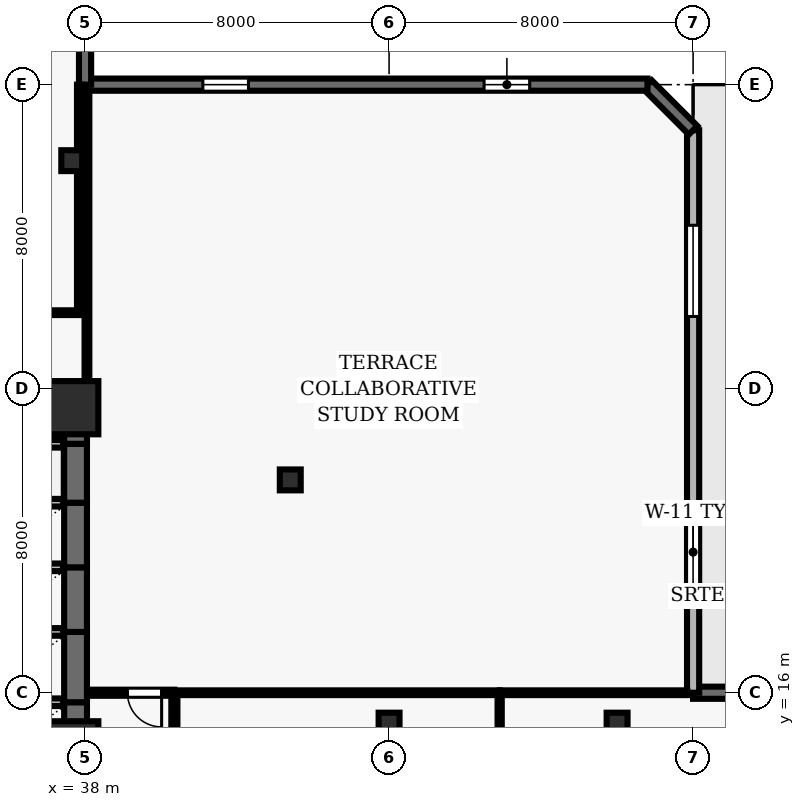
"""IFC4 building model, lengths in metres.
Left out: names, types, materials, properties, quantities, classifications, styles, units other than length and angle.
Written with IfcOpenShell. Run it as: python <this file> out.ifc"""

import sys

from ifc_helpers import new_model, si_unit, direction, frame, frame_2d, origin, origin_2d, place, context, subcontext, project, spatial, rectangle, hollow_rectangle, extrude, element, fill, save


model = new_model("IFC4")
c1 = context("Model", 3, precision=1e-05, world=origin(), true_north=direction((0.0, 1.0)))
c2 = subcontext(c1, "Body", "Model", "MODEL_VIEW")
j1 = project(units=[si_unit("LENGTHUNIT", "METRE"), si_unit("PLANEANGLEUNIT", "RADIAN")], contexts=[c1])
p1 = place(None, origin())
s1 = spatial("IfcSite", under=j1, at=p1, CompositionType="ELEMENT")
p2 = place(p1, origin())
s2 = spatial("IfcBuilding", under=s1, at=p2, CompositionType="ELEMENT")
p3 = place(p2, frame((0.0, 0.0, 26.0)))
s3 = spatial("IfcBuildingStorey", under=s2, at=p3, CompositionType="ELEMENT", Elevation=26.0)
for number, where, z_axis, x_axis in (
    (1, (37.65, 14.55, 0.0), (0.0, 0.0, 1.0), (1.0, 0.0, 0.0)),
    (2, (37.65, 23.5, 0.0), (0.0, 0.0, 1.0), (1.0, 0.0, 0.0)),
):
    element("IfcColumn", number, at=place(p3, frame(where, z_axis=z_axis, x_axis=x_axis)), inside=s3, PredefinedType="COLUMN", context=c2, shape_type="SweptSolid", body=[
        extrude(rectangle(XDim=1.4, YDim=1.4, at=origin_2d()), origin(), (0.0, 0.0, 1.0), 5.0),
    ])
for number, where, z_axis, x_axis in (
    (3, (46.0, 15.2, 0.0), (0.0, 0.0, 1.0), (1.0, 0.0, 0.0)),
    (4, (52.0, 15.2, 0.0), (0.0, 0.0, 1.0), (1.0, 0.0, 0.0)),
    (5, (37.65, 30.0, 0.0), (0.0, 0.0, 1.0), (1.0, 0.0, 0.0)),
    (6, (43.4, 21.6, 0.0), (0.0, 0.0, 1.0), (1.0, 0.0, 0.0)),
):
    element("IfcColumn", number, at=place(p3, frame(where, z_axis=z_axis, x_axis=x_axis)), inside=s3, PredefinedType="COLUMN", context=c2, shape_type="SweptSolid", body=[
        extrude(hollow_rectangle(XDim=0.55, YDim=0.55, WallThickness=0.025, at=origin_2d()), origin(), (0.0, 0.0, 1.0), 5.0),
    ])
p4 = place(p3, frame((73.5, 16.0, 0.0), z_axis=(0.0, 0.0, 1.0), x_axis=(-1.0, 0.0, 0.0)))
e7 = element("IfcWall", 7, at=p4, inside=s3, PredefinedType="SOLIDWALL", context=c2, shape_type="SweptSolid", body=[
    extrude(rectangle(XDim=19.5, YDim=0.32, at=frame_2d((9.75, 0.0))), origin(), (0.0, 0.0, 1.0), 4.79),
])
p5 = place(p4, frame((7.275, 0.0, 0.0)))
e8 = element("IfcOpeningElement", 8, at=p5, cuts=e7, PredefinedType="OPENING", context=c2, shape_type="SweptSolid", body=[
    extrude(rectangle(XDim=1.35, YDim=2.2, at=frame_2d((0.675, 1.1))), frame((0.0, 0.17, 0.0), z_axis=(0.0, -1.0, 0.0), x_axis=(1.0, 0.0, 0.0)), (0.0, 0.0, 1.0), 0.34),
])
p6 = place(p4, frame((2.35, 0.0, 0.9)))
e9 = element("IfcOpeningElement", 9, at=p6, cuts=e7, PredefinedType="OPENING", context=c2, shape_type="SweptSolid", body=[
    extrude(rectangle(XDim=1.8, YDim=2.2, at=frame_2d((0.9, 1.1))), frame((0.0, 0.17, 0.0), z_axis=(0.0, -1.0, 0.0), x_axis=(1.0, 0.0, 0.0)), (0.0, 0.0, 1.0), 0.34),
])
p7 = place(p3, frame((54.0, 16.0, 0.0), z_axis=(0.0, 0.0, 1.0), x_axis=(0.0, 1.0, 0.0)))
e10 = element("IfcWall", 10, at=p7, inside=s3, PredefinedType="SOLIDWALL", context=c2, shape_type="SweptSolid", body=[
    extrude(rectangle(XDim=14.8, YDim=0.32, at=frame_2d((7.4, 0.0))), origin(), (0.0, 0.0, 1.0), 4.79),
])
p8 = place(p7, frame((2.5, 0.0, 0.9)))
e11 = element("IfcOpeningElement", 11, at=p8, cuts=e10, PredefinedType="OPENING", context=c2, shape_type="SweptSolid", body=[
    extrude(rectangle(XDim=2.4, YDim=2.2, at=frame_2d((1.2, 1.1))), frame((0.0, 0.17, 0.0), z_axis=(0.0, -1.0, 0.0), x_axis=(1.0, 0.0, 0.0)), (0.0, 0.0, 1.0), 0.34),
])
p9 = place(p7, frame((9.9, 0.0, 0.9)))
e12 = element("IfcOpeningElement", 12, at=p9, cuts=e10, PredefinedType="OPENING", context=c2, shape_type="SweptSolid", body=[
    extrude(rectangle(XDim=2.4, YDim=2.2, at=frame_2d((1.2, 1.1))), frame((0.0, 0.17, 0.0), z_axis=(0.0, -1.0, 0.0), x_axis=(1.0, 0.0, 0.0)), (0.0, 0.0, 1.0), 0.34),
])
p10 = place(p3, frame((54.0, 30.8, 0.0), z_axis=(0.0, 0.0, 1.0), x_axis=(-0.707106781187, 0.707106781187, 0.0)))
e13 = element("IfcWall", 13, at=p10, inside=s3, PredefinedType="SOLIDWALL", context=c2, shape_type="SweptSolid", body=[
    extrude(rectangle(XDim=1.697, YDim=0.32, at=frame_2d((0.849, 0.0))), origin(), (0.0, 0.0, 1.0), 4.79),
])
p11 = place(p3, frame((52.8, 32.0, 0.0), z_axis=(0.0, 0.0, 1.0), x_axis=(-1.0, 0.0, 0.0)))
e14 = element("IfcWall", 14, at=p11, inside=s3, PredefinedType="SOLIDWALL", context=c2, shape_type="SweptSolid", body=[
    extrude(rectangle(XDim=14.8, YDim=0.32, at=frame_2d((7.4, 0.0))), origin(), (0.0, 0.0, 1.0), 4.79),
])
p12 = place(p11, frame((3.1, 0.0, 0.9)))
e15 = element("IfcOpeningElement", 15, at=p12, cuts=e14, PredefinedType="OPENING", context=c2, shape_type="SweptSolid", body=[
    extrude(rectangle(XDim=1.2, YDim=1.6, at=frame_2d((0.6, 0.8))), frame((0.0, 0.17, 0.0), z_axis=(0.0, -1.0, 0.0), x_axis=(1.0, 0.0, 0.0)), (0.0, 0.0, 1.0), 0.34),
])
p13 = place(p11, frame((10.5, 0.0, 0.9)))
e16 = element("IfcOpeningElement", 16, at=p13, cuts=e14, PredefinedType="OPENING", context=c2, shape_type="SweptSolid", body=[
    extrude(rectangle(XDim=1.2, YDim=1.6, at=frame_2d((0.6, 0.8))), frame((0.0, 0.17, 0.0), z_axis=(0.0, -1.0, 0.0), x_axis=(1.0, 0.0, 0.0)), (0.0, 0.0, 1.0), 0.34),
])
p14 = place(p3, frame((38.0, 32.0, 0.0), z_axis=(0.0, 0.0, 1.0), x_axis=(0.0, 1.0, 0.0)))
e17 = element("IfcWall", 17, at=p14, inside=s3, PredefinedType="SOLIDWALL", context=c2, shape_type="SweptSolid", body=[
    extrude(rectangle(XDim=19.5, YDim=0.32, at=frame_2d((9.75, 0.0))), origin(), (0.0, 0.0, 1.0), 4.79),
])
p15 = place(p14, frame((5.95, 0.0, 0.0)))
e18 = element("IfcOpeningElement", 18, at=p15, cuts=e17, PredefinedType="OPENING", context=c2, shape_type="SweptSolid", body=[
    extrude(rectangle(XDim=1.0, YDim=2.2, at=frame_2d((0.5, 1.1))), frame((0.0, 0.17, 0.0), z_axis=(0.0, -1.0, 0.0), x_axis=(1.0, 0.0, 0.0)), (0.0, 0.0, 1.0), 0.34),
])
p16 = place(p14, frame((9.9, 0.0, 0.9)))
e19 = element("IfcOpeningElement", 19, at=p16, cuts=e17, PredefinedType="OPENING", context=c2, shape_type="SweptSolid", body=[
    extrude(rectangle(XDim=1.5, YDim=1.6, at=frame_2d((0.75, 0.8))), frame((0.0, 0.17, 0.0), z_axis=(0.0, -1.0, 0.0), x_axis=(1.0, 0.0, 0.0)), (0.0, 0.0, 1.0), 0.34),
])
p17 = place(p14, frame((15.5, 0.0, 0.9)))
e20 = element("IfcOpeningElement", 20, at=p17, cuts=e17, PredefinedType="OPENING", context=c2, shape_type="SweptSolid", body=[
    extrude(rectangle(XDim=1.5, YDim=1.6, at=frame_2d((0.75, 0.8))), frame((0.0, 0.17, 0.0), z_axis=(0.0, -1.0, 0.0), x_axis=(1.0, 0.0, 0.0)), (0.0, 0.0, 1.0), 0.34),
])
p18 = place(p3, frame((37.75, 13.9, 0.0), z_axis=(0.0, 0.0, 1.0), x_axis=(0.0, 1.0, 0.0)))
e21 = element("IfcWall", 21, at=p18, inside=s3, PredefinedType="SHEAR", context=c2, shape_type="SweptSolid", body=[
    extrude(rectangle(XDim=1.85, YDim=0.6, at=frame_2d((0.925, 0.0))), origin(), (0.0, 0.0, 1.0), 4.79),
])
p19 = place(p3, frame((37.42, 15.75, 0.0), z_axis=(0.0, 0.0, 1.0), x_axis=(-1.0, 0.0, 0.0)))
e22 = element("IfcWall", 22, at=p19, inside=s3, PredefinedType="SOLIDWALL", context=c2, shape_type="SweptSolid", body=[
    extrude(rectangle(XDim=2.14, YDim=0.2, at=frame_2d((1.07, 0.0))), origin(), (0.0, 0.0, 1.0), 4.79),
])
p20 = place(p3, frame((37.75, 15.75, 0.0), z_axis=(0.0, 0.0, 1.0), x_axis=(0.0, 1.0, 0.0)))
e23 = element("IfcWall", 23, at=p20, inside=s3, PredefinedType="SHEAR", context=c2, shape_type="SweptSolid", body=[
    extrude(rectangle(XDim=1.85, YDim=0.6, at=frame_2d((0.925, 0.0))), origin(), (0.0, 0.0, 1.0), 4.79),
])
p21 = place(p3, frame((37.42, 17.6, 0.0), z_axis=(0.0, 0.0, 1.0), x_axis=(-1.0, 0.0, 0.0)))
e24 = element("IfcWall", 24, at=p21, inside=s3, PredefinedType="SOLIDWALL", context=c2, shape_type="SweptSolid", body=[
    extrude(rectangle(XDim=2.14, YDim=0.2, at=frame_2d((1.07, 0.0))), origin(), (0.0, 0.0, 1.0), 4.79),
])
p22 = place(p3, frame((37.75, 17.6, 0.0), z_axis=(0.0, 0.0, 1.0), x_axis=(0.0, 1.0, 0.0)))
e25 = element("IfcWall", 25, at=p22, inside=s3, PredefinedType="SHEAR", context=c2, shape_type="SweptSolid", body=[
    extrude(rectangle(XDim=1.7, YDim=0.6, at=frame_2d((0.85, 0.0))), origin(), (0.0, 0.0, 1.0), 4.79),
])
p23 = place(p3, frame((37.42, 19.3, 0.0), z_axis=(0.0, 0.0, 1.0), x_axis=(-1.0, 0.0, 0.0)))
e26 = element("IfcWall", 26, at=p23, inside=s3, PredefinedType="SOLIDWALL", context=c2, shape_type="SweptSolid", body=[
    extrude(rectangle(XDim=2.14, YDim=0.2, at=frame_2d((1.07, 0.0))), origin(), (0.0, 0.0, 1.0), 4.79),
])
p24 = place(p3, frame((37.75, 19.3, 0.0), z_axis=(0.0, 0.0, 1.0), x_axis=(0.0, 1.0, 0.0)))
e27 = element("IfcWall", 27, at=p24, inside=s3, PredefinedType="SHEAR", context=c2, shape_type="SweptSolid", body=[
    extrude(rectangle(XDim=1.7, YDim=0.6, at=frame_2d((0.85, 0.0))), origin(), (0.0, 0.0, 1.0), 4.79),
])
p25 = place(p3, frame((37.42, 21.0, 0.0), z_axis=(0.0, 0.0, 1.0), x_axis=(-1.0, 0.0, 0.0)))
e28 = element("IfcWall", 28, at=p25, inside=s3, PredefinedType="SOLIDWALL", context=c2, shape_type="SweptSolid", body=[
    extrude(rectangle(XDim=2.14, YDim=0.2, at=frame_2d((1.07, 0.0))), origin(), (0.0, 0.0, 1.0), 4.79),
])
p26 = place(p3, frame((37.75, 21.0, 0.0), z_axis=(0.0, 0.0, 1.0), x_axis=(0.0, 1.0, 0.0)))
e29 = element("IfcWall", 29, at=p26, inside=s3, PredefinedType="SHEAR", context=c2, shape_type="SweptSolid", body=[
    extrude(rectangle(XDim=1.55, YDim=0.6, at=frame_2d((0.775, 0.0))), origin(), (0.0, 0.0, 1.0), 4.79),
])
p27 = place(p3, frame((37.42, 22.55, 0.0), z_axis=(0.0, 0.0, 1.0), x_axis=(-1.0, 0.0, 0.0)))
e30 = element("IfcWall", 30, at=p27, inside=s3, PredefinedType="SOLIDWALL", context=c2, shape_type="SweptSolid", body=[
    extrude(rectangle(XDim=2.14, YDim=0.2, at=frame_2d((1.07, 0.0))), origin(), (0.0, 0.0, 1.0), 4.79),
])
p28 = place(p3, frame((37.75, 22.55, 0.0), z_axis=(0.0, 0.0, 1.0), x_axis=(0.0, 1.0, 0.0)))
e31 = element("IfcWall", 31, at=p28, inside=s3, PredefinedType="SHEAR", context=c2, shape_type="SweptSolid", body=[
    extrude(rectangle(XDim=1.5, YDim=0.6, at=frame_2d((0.75, 0.0))), origin(), (0.0, 0.0, 1.0), 4.79),
])
p29 = place(p3, frame((37.42, 24.05, 0.0), z_axis=(0.0, 0.0, 1.0), x_axis=(-1.0, 0.0, 0.0)))
e32 = element("IfcWall", 32, at=p29, inside=s3, PredefinedType="SOLIDWALL", context=c2, shape_type="SweptSolid", body=[
    extrude(rectangle(XDim=2.14, YDim=0.2, at=frame_2d((1.07, 0.0))), origin(), (0.0, 0.0, 1.0), 4.79),
])
p30 = place(p3, frame((35.15, 26.0, 0.0), z_axis=(0.0, 0.0, 1.0), x_axis=(1.0, 0.0, 0.0)))
e33 = element("IfcWall", 33, at=p30, inside=s3, PredefinedType="PARTITIONING", context=c2, shape_type="SweptSolid", body=[
    extrude(rectangle(XDim=2.7, YDim=0.125, at=frame_2d((1.35, 0.0))), origin(), (0.0, 0.0, 1.0), 4.79),
])
p31 = place(p3, frame((40.35, 16.0, 0.0), z_axis=(0.0, 0.0, 1.0), x_axis=(-1.0, 0.0, 0.0)))
e34 = element("IfcWall", 34, at=p31, inside=s3, PredefinedType="PARTITIONING", context=c2, shape_type="SweptSolid", body=[
    extrude(rectangle(XDim=2.27, YDim=0.16, at=frame_2d((1.135, 0.0))), origin(), (0.0, 0.0, 1.0), 4.79),
])
p32 = place(p31, frame((0.335, 0.0, 0.0)))
e35 = element("IfcOpeningElement", 35, at=p32, cuts=e34, PredefinedType="OPENING", context=c2, shape_type="SweptSolid", body=[
    extrude(rectangle(XDim=0.9, YDim=2.1, at=frame_2d((0.45, 1.05))), frame((0.0, 0.09, 0.0), z_axis=(0.0, -1.0, 0.0), x_axis=(1.0, 0.0, 0.0)), (0.0, 0.0, 1.0), 0.18),
])
p33 = place(p3, frame((48.91, 16.0, 0.0), z_axis=(0.0, 0.0, 1.0), x_axis=(1.0, 0.0, 0.0)))
e36 = element("IfcWall", 36, at=p33, inside=s3, PredefinedType="PARTITIONING", context=c2, shape_type="SweptSolid", body=[
    extrude(rectangle(XDim=4.935, YDim=0.125, at=frame_2d((2.468, 0.0))), origin(), (0.0, 0.0, 1.0), 4.79),
])
p34 = place(p3, frame((48.91, 16.0, 0.0), z_axis=(0.0, 0.0, 1.0), x_axis=(-1.0, 0.0, 0.0)))
e37 = element("IfcWall", 37, at=p34, inside=s3, PredefinedType="PARTITIONING", context=c2, shape_type="SweptSolid", body=[
    extrude(rectangle(XDim=8.56, YDim=0.125, at=frame_2d((4.28, 0.0))), origin(), (0.0, 0.0, 1.0), 4.79),
])
p35 = place(p3, frame((37.85, 26.058, 0.0), z_axis=(0.0, 0.0, 1.0), x_axis=(0.0, 1.0, 0.0)))
e38 = element("IfcWall", 38, at=p35, inside=s3, PredefinedType="PARTITIONING", context=c2, shape_type="SweptSolid", body=[
    extrude(rectangle(XDim=5.942, YDim=0.125, at=frame_2d((2.971, 0.0))), origin(), (0.0, 0.0, 1.0), 4.155),
])
p36 = place(p3, frame((38.05, 31.845, 0.0), z_axis=(0.0, 0.0, 1.0), x_axis=(0.0, -1.0, 0.0)))
e39 = element("IfcWall", 39, at=p36, inside=s3, PredefinedType="PARTITIONING", context=c2, shape_type="SweptSolid", body=[
    extrude(rectangle(XDim=7.795, YDim=0.125, at=frame_2d((3.897, 0.0))), origin(), (0.0, 0.0, 1.0), 4.155),
])
p37 = place(p3, frame((40.35, 10.425, 0.0), z_axis=(0.0, 0.0, 1.0), x_axis=(0.0, 1.0, 0.0)))
e40 = element("IfcWall", 40, at=p37, inside=s3, PredefinedType="PARTITIONING", context=c2, shape_type="SweptSolid", body=[
    extrude(rectangle(XDim=5.5, YDim=0.16, at=frame_2d((2.75, 0.0))), origin(), (0.0, 0.0, 1.0), 4.377),
])
p38 = place(p3, frame((48.91, 10.425, 0.0), z_axis=(0.0, 0.0, 1.0), x_axis=(0.0, 1.0, 0.0)))
e41 = element("IfcWall", 41, at=p38, inside=s3, PredefinedType="MOVABLE", context=c2, shape_type="SweptSolid", body=[
    extrude(rectangle(XDim=5.518, YDim=0.11, at=frame_2d((2.759, 0.0))), origin(), (0.0, 0.0, 1.0), 4.79),
])
p39 = place(p8, origin())
e42 = element("IfcWindow", 42, at=p39, inside=s3, PartitioningType="SINGLE_PANEL", PredefinedType="WINDOW", context=c2, shape_type="SweptSolid", body=[
    extrude(rectangle(XDim=2.4, YDim=2.2, at=frame_2d((1.2, 1.1))), frame((0.0, 0.03, 0.0), z_axis=(0.0, -1.0, 0.0), x_axis=(1.0, 0.0, 0.0)), (0.0, 0.0, 1.0), 0.06),
])
fill(e11, e42)
p40 = place(p9, origin())
e43 = element("IfcWindow", 43, at=p40, inside=s3, PartitioningType="SINGLE_PANEL", PredefinedType="WINDOW", context=c2, shape_type="SweptSolid", body=[
    extrude(rectangle(XDim=2.4, YDim=2.2, at=frame_2d((1.2, 1.1))), frame((0.0, 0.03, 0.0), z_axis=(0.0, -1.0, 0.0), x_axis=(1.0, 0.0, 0.0)), (0.0, 0.0, 1.0), 0.06),
])
fill(e12, e43)
p41 = place(p12, origin())
e44 = element("IfcWindow", 44, at=p41, inside=s3, PartitioningType="SINGLE_PANEL", PredefinedType="WINDOW", context=c2, shape_type="SweptSolid", body=[
    extrude(rectangle(XDim=1.2, YDim=1.6, at=frame_2d((0.6, 0.8))), frame((0.0, 0.03, 0.0), z_axis=(0.0, -1.0, 0.0), x_axis=(1.0, 0.0, 0.0)), (0.0, 0.0, 1.0), 0.06),
])
fill(e15, e44)
p42 = place(p13, origin())
e45 = element("IfcWindow", 45, at=p42, inside=s3, PartitioningType="SINGLE_PANEL", PredefinedType="WINDOW", context=c2, shape_type="SweptSolid", body=[
    extrude(rectangle(XDim=1.2, YDim=1.6, at=frame_2d((0.6, 0.8))), frame((0.0, 0.03, 0.0), z_axis=(0.0, -1.0, 0.0), x_axis=(1.0, 0.0, 0.0)), (0.0, 0.0, 1.0), 0.06),
])
fill(e16, e45)
p43 = place(p32, origin())
e46 = element("IfcDoor", 46, at=p43, inside=s3, OperationType="SINGLE_SWING_LEFT", PredefinedType="DOOR", context=c2, shape_type="SweptSolid", body=[
    extrude(rectangle(XDim=0.9, YDim=2.1, at=frame_2d((0.45, 1.05))), frame((0.0, 0.025, 0.0), z_axis=(0.0, -1.0, 0.0), x_axis=(1.0, 0.0, 0.0)), (0.0, 0.0, 1.0), 0.05),
])
fill(e35, e46)
save(model, sys.argv[1])
